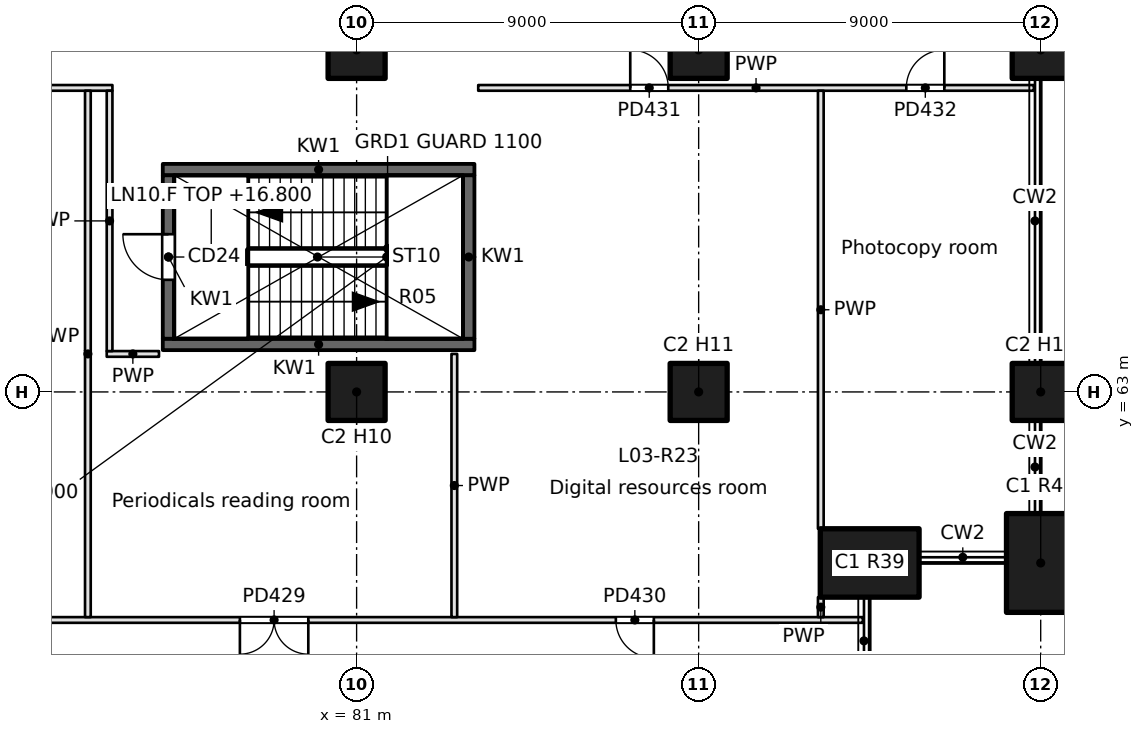
"""IFC4 building model, lengths in metres.
Left out: names, types, materials, properties, quantities, classifications, styles, units other than length and angle.
Written with IfcOpenShell. Run it as: python <this file> out.ifc"""

import sys

from ifc_helpers import new_model, si_unit, direction, frame, frame_2d, origin, origin_2d, place, context, subcontext, project, spatial, rectangle, extrude, element, fill, save


model = new_model("IFC4")
c1 = context("Model", 3, precision=1e-05, world=origin(), true_north=direction((0.0, 1.0)))
c2 = subcontext(c1, "Body", "Model", "MODEL_VIEW")
j1 = project(units=[si_unit("LENGTHUNIT", "METRE"), si_unit("PLANEANGLEUNIT", "RADIAN")], contexts=[c1])
p1 = place(None, origin())
s1 = spatial("IfcSite", under=j1, at=p1, CompositionType="ELEMENT")
p2 = place(p1, origin())
s2 = spatial("IfcBuilding", under=s1, at=p2, CompositionType="ELEMENT")
p3 = place(p2, frame((0.0, 0.0, 16.8)))
s3 = spatial("IfcBuildingStorey", under=s2, at=p3, CompositionType="ELEMENT", Elevation=16.8)
for number, where, z_axis, x_axis in (
    (1, (94.5, 58.5, 0.0), (0.0, 0.0, 1.0), (1.0, 0.0, 0.0)),
    (2, (99.0, 58.5, 0.0), (0.0, 0.0, 1.0), (0.0, 1.0, 0.0)),
):
    element("IfcColumn", number, at=place(p3, frame(where, z_axis=z_axis, x_axis=x_axis)), inside=s3, PredefinedType="COLUMN", context=c2, shape_type="SweptSolid", body=[
        extrude(rectangle(XDim=2.6, YDim=1.8, at=origin_2d()), origin(), (0.0, 0.0, 1.0), 4.8),
    ])
for number, where, z_axis, x_axis in (
    (3, (99.0, 63.0, 0.0), (0.0, 0.0, 1.0), (1.0, 0.0, 0.0)),
    (4, (99.0, 72.0, 0.0), (0.0, 0.0, 1.0), (1.0, 0.0, 0.0)),
    (5, (81.0, 63.0, 0.0), (0.0, 0.0, 1.0), (1.0, 0.0, 0.0)),
    (6, (81.0, 72.0, 0.0), (0.0, 0.0, 1.0), (1.0, 0.0, 0.0)),
    (7, (90.0, 63.0, 0.0), (0.0, 0.0, 1.0), (1.0, 0.0, 0.0)),
    (8, (90.0, 72.0, 0.0), (0.0, 0.0, 1.0), (1.0, 0.0, 0.0)),
):
    element("IfcColumn", number, at=place(p3, frame(where, z_axis=z_axis, x_axis=x_axis)), inside=s3, PredefinedType="COLUMN", context=c2, shape_type="SweptSolid", body=[
        extrude(rectangle(XDim=1.5, YDim=1.5, at=origin_2d()), origin(), (0.0, 0.0, 1.0), 4.8),
    ])
for number, where, z_axis, x_axis in (
    (9, (75.9, 64.25, -0.35), (0.0, 0.0, 1.0), (1.0, 0.0, 0.0)),
    (10, (75.9, 68.85, -0.35), (0.0, 0.0, 1.0), (1.0, 0.0, 0.0)),
):
    element("IfcWall", number, at=place(p3, frame(where, z_axis=z_axis, x_axis=x_axis)), inside=s3, PredefinedType="SOLIDWALL", context=c2, shape_type="SweptSolid", body=[
        extrude(rectangle(XDim=8.2, YDim=0.3, at=frame_2d((4.1, 0.0))), origin(), (0.0, 0.0, 1.0), 4.8),
    ])
p4 = place(p3, frame((76.05, 64.4, -0.35), z_axis=(0.0, 0.0, 1.0), x_axis=(0.0, 1.0, 0.0)))
e11 = element("IfcWall", 11, at=p4, inside=s3, PredefinedType="SOLIDWALL", context=c2, shape_type="SweptSolid", body=[
    extrude(rectangle(XDim=4.3, YDim=0.3, at=frame_2d((2.15, 0.0))), origin(), (0.0, 0.0, 1.0), 4.8),
])
p5 = place(p4, frame((1.55, 0.0, 0.35)))
e12 = element("IfcOpeningElement", 12, at=p5, cuts=e11, PredefinedType="OPENING", context=c2, shape_type="SweptSolid", body=[
    extrude(rectangle(XDim=1.2, YDim=2.1, at=frame_2d((0.6, 1.05))), frame((0.0, 0.15, 0.0), z_axis=(0.0, -1.0, 0.0), x_axis=(1.0, 0.0, 0.0)), (0.0, 0.0, 1.0), 0.3),
])
p6 = place(p3, frame((83.95, 64.4, -0.35), z_axis=(0.0, 0.0, 1.0), x_axis=(0.0, 1.0, 0.0)))
e13 = element("IfcWall", 13, at=p6, inside=s3, PredefinedType="SOLIDWALL", context=c2, shape_type="SweptSolid", body=[
    extrude(rectangle(XDim=4.3, YDim=0.3, at=frame_2d((2.15, 0.0))), origin(), (0.0, 0.0, 1.0), 4.8),
])
p7 = place(p3, frame((74.425, 64.0, 0.0), z_axis=(0.0, 0.0, 1.0), x_axis=(1.0, 0.0, 0.0)))
e14 = element("IfcWall", 14, at=p7, inside=s3, PredefinedType="PARTITIONING", context=c2, shape_type="SweptSolid", body=[
    extrude(rectangle(XDim=1.375, YDim=0.15, at=frame_2d((0.688, 0.0))), origin(), (0.0, 0.0, 1.0), 4.45),
])
p8 = place(p3, frame((94.32, 57.0, 0.0), z_axis=(0.0, 0.0, 1.0), x_axis=(-1.0, 0.0, 0.0)))
e15 = element("IfcWall", 15, at=p8, inside=s3, PredefinedType="PARTITIONING", context=c2, shape_type="SweptSolid", body=[
    extrude(rectangle(XDim=49.395, YDim=0.15, at=frame_2d((24.698, 0.0))), origin(), (0.0, 0.0, 1.0), 4.45),
])
p9 = place(p8, frame((44.07, 0.0, 0.0)))
e16 = element("IfcOpeningElement", 16, at=p9, cuts=e15, PredefinedType="OPENING", context=c2, shape_type="SweptSolid", body=[
    extrude(rectangle(XDim=1.0, YDim=2.1, at=frame_2d((0.5, 1.05))), frame((0.0, 0.075, 0.0), z_axis=(0.0, -1.0, 0.0), x_axis=(1.0, 0.0, 0.0)), (0.0, 0.0, 1.0), 0.15),
])
p10 = place(p8, frame((34.427, 0.0, 0.0)))
e17 = element("IfcOpeningElement", 17, at=p10, cuts=e15, PredefinedType="OPENING", context=c2, shape_type="SweptSolid", body=[
    extrude(rectangle(XDim=1.0, YDim=2.1, at=frame_2d((0.5, 1.05))), frame((0.0, 0.075, 0.0), z_axis=(0.0, -1.0, 0.0), x_axis=(1.0, 0.0, 0.0)), (0.0, 0.0, 1.0), 0.15),
])
p11 = place(p8, frame((24.784, 0.0, 0.0)))
e18 = element("IfcOpeningElement", 18, at=p11, cuts=e15, PredefinedType="OPENING", context=c2, shape_type="SweptSolid", body=[
    extrude(rectangle(XDim=1.0, YDim=2.1, at=frame_2d((0.5, 1.05))), frame((0.0, 0.075, 0.0), z_axis=(0.0, -1.0, 0.0), x_axis=(1.0, 0.0, 0.0)), (0.0, 0.0, 1.0), 0.15),
])
p12 = place(p8, frame((14.591, 0.0, 0.0)))
e19 = element("IfcOpeningElement", 19, at=p12, cuts=e15, PredefinedType="OPENING", context=c2, shape_type="SweptSolid", body=[
    extrude(rectangle(XDim=1.8, YDim=2.1, at=frame_2d((0.9, 1.05))), frame((0.0, 0.075, 0.0), z_axis=(0.0, -1.0, 0.0), x_axis=(1.0, 0.0, 0.0)), (0.0, 0.0, 1.0), 0.15),
])
p13 = place(p8, frame((5.499, 0.0, 0.0)))
e20 = element("IfcOpeningElement", 20, at=p13, cuts=e15, PredefinedType="OPENING", context=c2, shape_type="SweptSolid", body=[
    extrude(rectangle(XDim=1.0, YDim=2.1, at=frame_2d((0.5, 1.05))), frame((0.0, 0.075, 0.0), z_axis=(0.0, -1.0, 0.0), x_axis=(1.0, 0.0, 0.0)), (0.0, 0.0, 1.0), 0.15),
])
p14 = place(p3, frame((45.875, 71.0, 0.0), z_axis=(0.0, 0.0, 1.0), x_axis=(1.0, 0.0, 0.0)))
e21 = element("IfcWall", 21, at=p14, inside=s3, PredefinedType="PARTITIONING", context=c2, shape_type="SweptSolid", body=[
    extrude(rectangle(XDim=28.7, YDim=0.15, at=frame_2d((14.35, 0.0))), origin(), (0.0, 0.0, 1.0), 4.45),
])
p15 = place(p14, frame((4.0, 0.0, 0.0)))
e22 = element("IfcOpeningElement", 22, at=p15, cuts=e21, PredefinedType="OPENING", context=c2, shape_type="SweptSolid", body=[
    extrude(rectangle(XDim=1.0, YDim=2.1, at=frame_2d((0.5, 1.05))), frame((0.0, 0.075, 0.0), z_axis=(0.0, -1.0, 0.0), x_axis=(1.0, 0.0, 0.0)), (0.0, 0.0, 1.0), 0.15),
])
p16 = place(p14, frame((13.018, 0.0, 0.0)))
e23 = element("IfcOpeningElement", 23, at=p16, cuts=e21, PredefinedType="OPENING", context=c2, shape_type="SweptSolid", body=[
    extrude(rectangle(XDim=1.0, YDim=2.1, at=frame_2d((0.5, 1.05))), frame((0.0, 0.075, 0.0), z_axis=(0.0, -1.0, 0.0), x_axis=(1.0, 0.0, 0.0)), (0.0, 0.0, 1.0), 0.15),
])
p17 = place(p14, frame((22.661, 0.0, 0.0)))
e24 = element("IfcOpeningElement", 24, at=p17, cuts=e21, PredefinedType="OPENING", context=c2, shape_type="SweptSolid", body=[
    extrude(rectangle(XDim=1.0, YDim=2.1, at=frame_2d((0.5, 1.05))), frame((0.0, 0.075, 0.0), z_axis=(0.0, -1.0, 0.0), x_axis=(1.0, 0.0, 0.0)), (0.0, 0.0, 1.0), 0.15),
])
p18 = place(p3, frame((84.2, 71.0, 0.0), z_axis=(0.0, 0.0, 1.0), x_axis=(1.0, 0.0, 0.0)))
e25 = element("IfcWall", 25, at=p18, inside=s3, PredefinedType="PARTITIONING", context=c2, shape_type="SweptSolid", body=[
    extrude(rectangle(XDim=14.62, YDim=0.15, at=frame_2d((7.31, 0.0))), origin(), (0.0, 0.0, 1.0), 4.45),
])
p19 = place(p18, frame((4.0, 0.0, 0.0)))
e26 = element("IfcOpeningElement", 26, at=p19, cuts=e25, PredefinedType="OPENING", context=c2, shape_type="SweptSolid", body=[
    extrude(rectangle(XDim=1.0, YDim=2.1, at=frame_2d((0.5, 1.05))), frame((0.0, 0.075, 0.0), z_axis=(0.0, -1.0, 0.0), x_axis=(1.0, 0.0, 0.0)), (0.0, 0.0, 1.0), 0.15),
])
p20 = place(p18, frame((11.264, 0.0, 0.0)))
e27 = element("IfcOpeningElement", 27, at=p20, cuts=e25, PredefinedType="OPENING", context=c2, shape_type="SweptSolid", body=[
    extrude(rectangle(XDim=1.0, YDim=2.1, at=frame_2d((0.5, 1.05))), frame((0.0, 0.075, 0.0), z_axis=(0.0, -1.0, 0.0), x_axis=(1.0, 0.0, 0.0)), (0.0, 0.0, 1.0), 0.15),
])
p21 = place(p3, frame((73.929, 57.075, 0.0), z_axis=(0.0, 0.0, 1.0), x_axis=(0.0, 1.0, 0.0)))
e28 = element("IfcWall", 28, at=p21, inside=s3, PredefinedType="PARTITIONING", context=c2, shape_type="SweptSolid", body=[
    extrude(rectangle(XDim=13.85, YDim=0.15, at=frame_2d((6.925, 0.0))), origin(), (0.0, 0.0, 1.0), 4.45),
])
p22 = place(p3, frame((83.571, 57.075, 0.0), z_axis=(0.0, 0.0, 1.0), x_axis=(0.0, 1.0, 0.0)))
e29 = element("IfcWall", 29, at=p22, inside=s3, PredefinedType="PARTITIONING", context=c2, shape_type="SweptSolid", body=[
    extrude(rectangle(XDim=6.925, YDim=0.15, at=frame_2d((3.462, 0.0))), origin(), (0.0, 0.0, 1.0), 4.45),
])
p23 = place(p3, frame((74.5, 70.925, 0.0), z_axis=(0.0, 0.0, 1.0), x_axis=(0.0, -1.0, 0.0)))
e30 = element("IfcWall", 30, at=p23, inside=s3, PredefinedType="PARTITIONING", context=c2, shape_type="SweptSolid", body=[
    extrude(rectangle(XDim=6.85, YDim=0.15, at=frame_2d((3.425, 0.0))), origin(), (0.0, 0.0, 1.0), 4.45),
])
p24 = place(p3, frame((93.214, 57.075, 0.0), z_axis=(0.0, 0.0, 1.0), x_axis=(0.0, 1.0, 0.0)))
e31 = element("IfcWall", 31, at=p24, inside=s3, PredefinedType="PARTITIONING", context=c2, shape_type="SweptSolid", body=[
    extrude(rectangle(XDim=0.525, YDim=0.15, at=frame_2d((0.263, 0.0))), origin(), (0.0, 0.0, 1.0), 4.45),
])
p25 = place(p3, frame((93.214, 59.4, 0.0), z_axis=(0.0, 0.0, 1.0), x_axis=(0.0, 1.0, 0.0)))
e32 = element("IfcWall", 32, at=p25, inside=s3, PredefinedType="PARTITIONING", context=c2, shape_type="SweptSolid", body=[
    extrude(rectangle(XDim=11.525, YDim=0.15, at=frame_2d((5.763, 0.0))), origin(), (0.0, 0.0, 1.0), 4.45),
])
p26 = place(p5, origin())
e33 = element("IfcDoor", 33, at=p26, inside=s3, OperationType="SINGLE_SWING_RIGHT", PredefinedType="DOOR", context=c2, shape_type="SweptSolid", body=[
    extrude(rectangle(XDim=1.2, YDim=2.1, at=frame_2d((0.6, 1.05))), frame((0.0, 0.025, 0.0), z_axis=(0.0, -1.0, 0.0), x_axis=(1.0, 0.0, 0.0)), (0.0, 0.0, 1.0), 0.05),
])
fill(e12, e33)
p27 = place(p12, origin())
e34 = element("IfcDoor", 34, at=p27, inside=s3, OperationType="DOUBLE_DOOR_SINGLE_SWING", PredefinedType="DOOR", context=c2, shape_type="SweptSolid", body=[
    extrude(rectangle(XDim=1.8, YDim=2.1, at=frame_2d((0.9, 1.05))), frame((0.0, 0.025, 0.0), z_axis=(0.0, -1.0, 0.0), x_axis=(1.0, 0.0, 0.0)), (0.0, 0.0, 1.0), 0.05),
])
fill(e19, e34)
p28 = place(p13, origin())
e35 = element("IfcDoor", 35, at=p28, inside=s3, OperationType="SINGLE_SWING_LEFT", PredefinedType="DOOR", context=c2, shape_type="SweptSolid", body=[
    extrude(rectangle(XDim=1.0, YDim=2.1, at=frame_2d((0.5, 1.05))), frame((0.0, 0.025, 0.0), z_axis=(0.0, -1.0, 0.0), x_axis=(1.0, 0.0, 0.0)), (0.0, 0.0, 1.0), 0.05),
])
fill(e20, e35)
p29 = place(p19, origin())
e36 = element("IfcDoor", 36, at=p29, inside=s3, OperationType="SINGLE_SWING_LEFT", PredefinedType="DOOR", context=c2, shape_type="SweptSolid", body=[
    extrude(rectangle(XDim=1.0, YDim=2.1, at=frame_2d((0.5, 1.05))), frame((0.0, 0.025, 0.0), z_axis=(0.0, -1.0, 0.0), x_axis=(1.0, 0.0, 0.0)), (0.0, 0.0, 1.0), 0.05),
])
fill(e26, e36)
p30 = place(p20, origin())
e37 = element("IfcDoor", 37, at=p30, inside=s3, OperationType="SINGLE_SWING_RIGHT", PredefinedType="DOOR", context=c2, shape_type="SweptSolid", body=[
    extrude(rectangle(XDim=1.0, YDim=2.1, at=frame_2d((0.5, 1.05))), frame((0.0, 0.025, 0.0), z_axis=(0.0, -1.0, 0.0), x_axis=(1.0, 0.0, 0.0)), (0.0, 0.0, 1.0), 0.05),
])
fill(e27, e37)
save(model, sys.argv[1])
